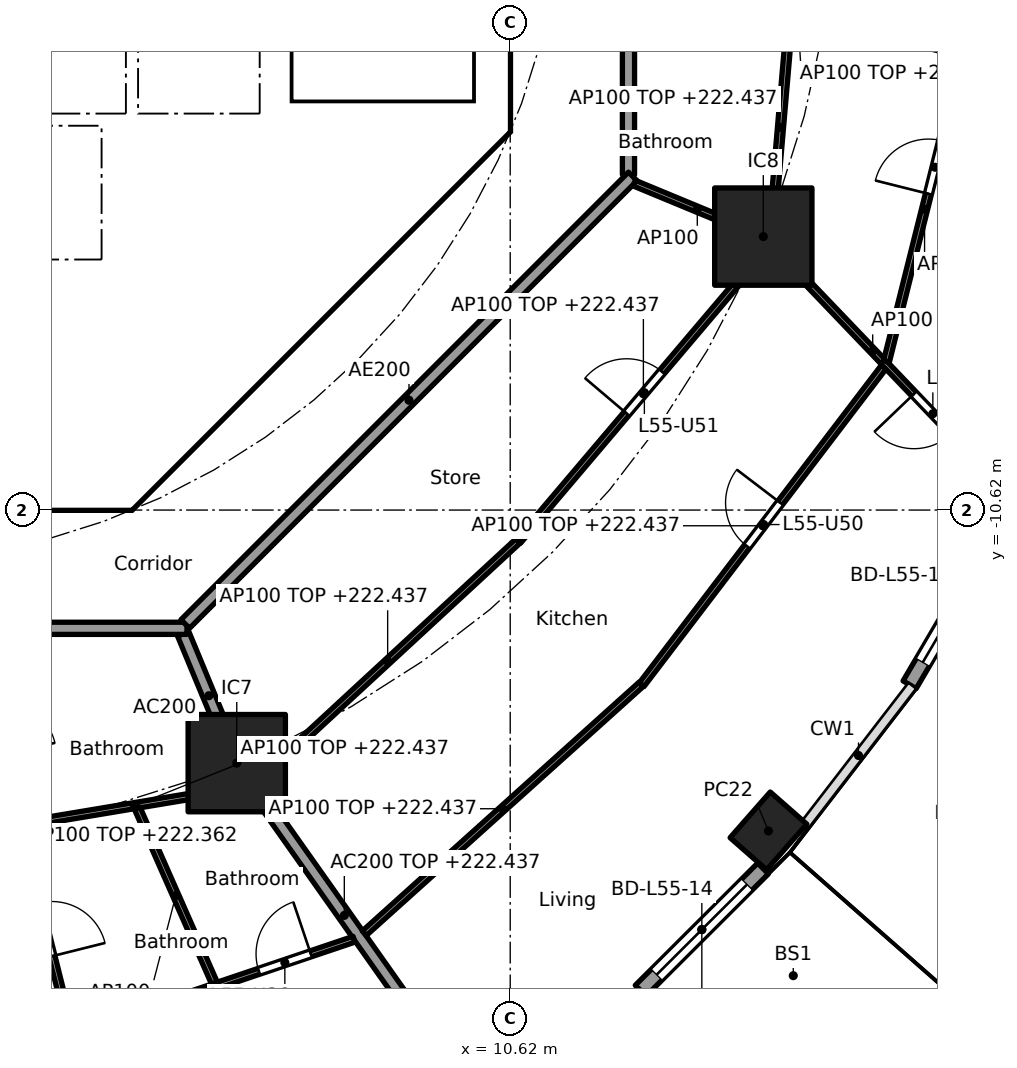
"""IFC4 building model, lengths in metres.
Left out: names, types, materials, properties, quantities, classifications, styles, units other than length and angle.
Written with IfcOpenShell. Run it as: python <this file> out.ifc"""

import sys

from ifc_helpers import new_model, si_unit, direction, frame, frame_2d, origin, origin_2d, place, context, subcontext, project, spatial, polyline, rectangle, hollow_rectangle, outline, extrude, element, fill, save


model = new_model("IFC4")
c1 = context("Model", 3, precision=1e-05, world=origin(), true_north=direction((0.0, 1.0)))
c2 = subcontext(c1, "Body", "Model", "MODEL_VIEW")
j1 = project(units=[si_unit("LENGTHUNIT", "METRE"), si_unit("PLANEANGLEUNIT", "RADIAN")], contexts=[c1])
p1 = place(None, origin())
s1 = spatial("IfcSite", under=j1, at=p1, CompositionType="ELEMENT")
p2 = place(p1, origin())
s2 = spatial("IfcBuilding", under=s1, at=p2, CompositionType="ELEMENT")
p3 = place(p2, frame((0.0, 0.0, 219.6)))
s3 = spatial("IfcBuildingStorey", under=s2, at=p3, CompositionType="ELEMENT", Elevation=219.6)
p4 = place(p3, frame((14.866, -15.896, 0.0), z_axis=(0.0, 0.0, 1.0), x_axis=(0.660114607735, 0.751164898445, 0.0)))
e1 = element("IfcColumn", 1, at=p4, inside=s3, PredefinedType="COLUMN", context=c2, shape_type="SweptSolid", body=[
    extrude(hollow_rectangle(XDim=1.0, YDim=0.8, WallThickness=0.032, at=origin_2d()), origin(), (0.0, 0.0, 1.0), 3.7),
])
for number, where, z_axis, x_axis in (
    (2, (6.123, -14.782, 0.0), (0.0, 0.0, 1.0), (1.0, 0.0, 0.0)),
    (3, (14.782, -6.123, 0.0), (0.0, 0.0, 1.0), (1.0, 0.0, 0.0)),
):
    element("IfcColumn", number, at=place(p3, frame(where, z_axis=z_axis, x_axis=x_axis)), inside=s3, PredefinedType="COLUMN", context=c2, shape_type="SweptSolid", body=[
        extrude(rectangle(XDim=1.6, YDim=1.6, at=origin_2d()), origin(), (0.0, 0.0, 1.0), 3.7),
    ])
p5 = place(p3, frame((14.778, -16.515, 0.0), z_axis=(0.0, 0.0, 1.0), x_axis=(-0.707836044127, -0.706376765356, 0.0)))
e4 = element("IfcWall", 4, at=p5, inside=s3, PredefinedType="SOLIDWALL", context=c2, shape_type="SweptSolid", body=[
    extrude(rectangle(XDim=2.844, YDim=0.25, at=frame_2d((1.422, 0.0))), origin(), (0.0, 0.0, 1.0), 3.44),
])
p6 = place(p5, frame((0.372, 0.0, 0.0)))
e5 = element("IfcOpeningElement", 5, at=p6, cuts=e4, PredefinedType="OPENING", context=c2, shape_type="SweptSolid", body=[
    extrude(rectangle(XDim=2.1, YDim=2.4, at=frame_2d((1.05, 1.2))), frame((0.0, 0.135, 0.0), z_axis=(0.0, -1.0, 0.0), x_axis=(1.0, 0.0, 0.0)), (0.0, 0.0, 1.0), 0.27),
])
p7 = place(p3, frame((18.684, -10.945, 0.0), z_axis=(0.0, 0.0, 1.0), x_axis=(-0.5063555387, -0.862324804484, 0.0)))
e6 = element("IfcWall", 6, at=p7, inside=s3, PredefinedType="SOLIDWALL", context=c2, shape_type="SweptSolid", body=[
    extrude(rectangle(XDim=2.955, YDim=0.25, at=frame_2d((1.477, 0.0))), origin(), (0.0, 0.0, 1.0), 3.44),
])
p8 = place(p7, frame((0.427, 0.0, 0.0)))
e7 = element("IfcOpeningElement", 7, at=p8, cuts=e6, PredefinedType="OPENING", context=c2, shape_type="SweptSolid", body=[
    extrude(rectangle(XDim=2.1, YDim=2.4, at=frame_2d((1.05, 1.2))), frame((0.0, 0.135, 0.0), z_axis=(0.0, -1.0, 0.0), x_axis=(1.0, 0.0, 0.0)), (0.0, 0.0, 1.0), 0.27),
])
p9 = place(p3, frame((4.613, -9.988, 0.0), z_axis=(0.0, 0.0, 1.0), x_axis=(0.707106781187, 0.707106781187, 0.0)))
e8 = element("IfcWall", 8, at=p9, inside=s3, PredefinedType="SHEAR", context=c2, shape_type="SweptSolid", body=[
    extrude(rectangle(XDim=7.602, YDim=0.6, at=frame_2d((3.801, 0.0))), origin(), (0.0, 0.0, 1.0), 3.44),
])
p10 = place(p9, frame((3.201, 0.0, 0.0)))
e9 = element("IfcOpeningElement", 9, at=p10, cuts=e8, PredefinedType="OPENING", context=c2, shape_type="SweptSolid", body=[
    extrude(rectangle(XDim=1.2, YDim=2.1, at=frame_2d((0.6, 1.05))), frame((0.0, 0.31, 0.0), z_axis=(0.0, -1.0, 0.0), x_axis=(1.0, 0.0, 0.0)), (0.0, 0.0, 1.0), 0.62),
])
p11 = place(p3, frame((4.0, -10.025, 0.0), z_axis=(0.0, 0.0, 1.0), x_axis=(0.0, 1.0, 0.0)))
e10 = element("IfcWall", 10, at=p11, inside=s3, PredefinedType="SOLIDWALL", context=c2, shape_type="SweptSolid", body=[
    extrude(rectangle(XDim=3.0, YDim=0.2, at=frame_2d((1.5, 0.0))), origin(), (0.0, 0.0, 1.0), 3.44),
])
p12 = place(p11, frame((0.975, 0.0, 0.0)))
e11 = element("IfcOpeningElement", 11, at=p12, cuts=e10, PredefinedType="OPENING", context=c2, shape_type="SweptSolid", body=[
    extrude(rectangle(XDim=1.1, YDim=2.1, at=frame_2d((0.55, 1.05))), frame((0.0, 0.11, 0.0), z_axis=(0.0, -1.0, 0.0), x_axis=(1.0, 0.0, 0.0)), (0.0, 0.0, 1.0), 0.22),
])
p13 = place(p3, frame((4.0, -6.5, 0.0), z_axis=(0.0, 0.0, 1.0), x_axis=(0.0, 1.0, 0.0)))
e12 = element("IfcWall", 12, at=p13, inside=s3, PredefinedType="SOLIDWALL", context=c2, shape_type="SweptSolid", body=[
    extrude(rectangle(XDim=2.2, YDim=0.2, at=frame_2d((1.1, 0.0))), origin(), (0.0, 0.0, 1.0), 3.44),
])
p14 = place(p13, frame((0.55, 0.0, 0.0)))
e13 = element("IfcOpeningElement", 13, at=p14, cuts=e12, PredefinedType="OPENING", context=c2, shape_type="SweptSolid", body=[
    extrude(rectangle(XDim=1.1, YDim=2.1, at=frame_2d((0.55, 1.05))), frame((0.0, 0.11, 0.0), z_axis=(0.0, -1.0, 0.0), x_axis=(1.0, 0.0, 0.0)), (0.0, 0.0, 1.0), 0.22),
])
p15 = place(p3, origin())
e14 = element("IfcWall", 14, at=p15, inside=s3, PredefinedType="SHEAR", context=c2, shape_type="SweptSolid", body=[
    extrude(outline(polyline([(-4.152, -10.025), (4.152, -10.025), (4.401, -9.776), (4.825, -10.2), (4.401, -10.625), (-4.401, -10.625), (-4.825, -10.2), (-4.401, -9.776), (-4.152, -10.025)])), origin(), (0.0, 0.0, 1.0), 3.44),
])
p16 = place(p3, origin())
e15 = element("IfcWall", 15, at=p16, inside=s3, PredefinedType="SHEAR", context=c2, shape_type="SweptSolid", body=[
    extrude(outline(polyline([(9.776, -4.401), (10.025, -4.152), (10.025, -3.801), (10.025, 4.152), (9.776, 4.401), (10.2, 4.825), (10.625, 4.401), (10.625, -4.401), (10.2, -4.825), (9.776, -4.401)])), origin(), (0.0, 0.0, 1.0), 3.44),
])
p17 = place(p3, origin())
e16 = element("IfcWall", 16, at=p17, inside=s3, PredefinedType="SOLIDWALL", context=c2, shape_type="SweptSolid", body=[
    extrude(outline(polyline([(-6.7, -2.1), (-6.5, -2.1), (-6.5, -4.1), (-2.3, -4.1), (-2.3, -2.1), (-2.1, -2.1), (-2.1, -4.1), (-0.1, -4.1), (-0.1, -2.1), (0.1, -2.1), (0.1, -4.1), (2.1, -4.1), (2.1, -2.1), (2.3, -2.1), (2.3, -4.1), (4.3, -4.1), (4.3, -2.1), (4.5, -2.1), (4.5, -4.1), (6.5, -4.1), (6.5, -2.1), (6.7, -2.1), (6.7, -4.3), (-6.7, -4.3), (-6.7, -2.1)])), origin(), (0.0, 0.0, 1.0), 3.44),
])
p18 = place(p3, origin())
e17 = element("IfcWall", 17, at=p18, inside=s3, PredefinedType="SOLIDWALL", context=c2, shape_type="SweptSolid", body=[
    extrude(outline(polyline([(4.1, -7.025), (-4.1, -7.025), (-4.1, -6.5), (4.1, -6.5), (4.1, -7.025)])), origin(), (0.0, 0.0, 1.0), 3.44),
])
p19 = place(p3, origin())
e18 = element("IfcWall", 18, at=p19, inside=s3, PredefinedType="SOLIDWALL", context=c2, shape_type="SweptSolid", body=[
    extrude(outline(polyline([(7.025, -3.9), (6.7, -3.9), (6.7, 3.9), (7.025, 3.9), (7.025, -3.9)])), origin(), (0.0, 0.0, 1.0), 3.44),
])
p20 = place(p3, origin())
e19 = element("IfcWall", 19, at=p20, inside=s3, PredefinedType="SOLIDWALL", context=c2, shape_type="SweptSolid", body=[
    extrude(outline(polyline([(10.025, -4.1), (6.7, -4.1), (6.7, -3.9), (10.025, -3.9), (10.025, -4.1)])), origin(), (0.0, 0.0, 1.0), 3.44),
])
p21 = place(p3, frame((5.243, -12.657, 0.0), z_axis=(0.0, 0.0, 1.0), x_axis=(0.382691608661, -0.923876145736, 0.0)))
e20 = element("IfcWall", 20, at=p21, inside=s3, PredefinedType="PARTITIONING", context=c2, shape_type="SweptSolid", body=[
    extrude(rectangle(XDim=2.2, YDim=0.2, at=frame_2d((1.1, 0.0))), origin(), (0.0, 0.0, 1.0), 3.44),
])
p22 = place(p3, frame((6.152, -14.823, 0.0), z_axis=(0.0, 0.0, 1.0), x_axis=(0.576994695158, -0.816747893637, 0.0)))
e21 = element("IfcWall", 21, at=p22, inside=s3, PredefinedType="PARTITIONING", context=c2, shape_type="SweptSolid", body=[
    extrude(rectangle(XDim=6.03, YDim=0.2, at=frame_2d((3.015, 0.0))), origin(), (0.0, 0.0, 1.0), 2.837),
])
p23 = place(p3, frame((12.565, -5.104, 0.0), z_axis=(0.0, 0.0, 1.0), x_axis=(0.0, 1.0, 0.0)))
e22 = element("IfcWall", 22, at=p23, inside=s3, PredefinedType="PARTITIONING", context=c2, shape_type="SweptSolid", body=[
    extrude(rectangle(XDim=10.209, YDim=0.2, at=frame_2d((5.104, 0.0))), origin(), (0.0, 0.0, 1.0), 3.44),
])
p24 = place(p23, frame((4.604, 0.0, 0.0)))
e23 = element("IfcOpeningElement", 23, at=p24, cuts=e22, PredefinedType="OPENING", context=c2, shape_type="SweptSolid", body=[
    extrude(rectangle(XDim=1.0, YDim=2.1, at=frame_2d((0.5, 1.05))), frame((0.0, 0.11, 0.0), z_axis=(0.0, -1.0, 0.0), x_axis=(1.0, 0.0, 0.0)), (0.0, 0.0, 1.0), 0.22),
])
p25 = place(p3, frame((-5.104, -12.565, 0.0), z_axis=(0.0, 0.0, 1.0), x_axis=(1.0, 0.0, 0.0)))
e24 = element("IfcWall", 24, at=p25, inside=s3, PredefinedType="PARTITIONING", context=c2, shape_type="SweptSolid", body=[
    extrude(rectangle(XDim=10.409, YDim=0.2, at=frame_2d((5.205, 0.0))), origin(), (0.0, 0.0, 1.0), 3.44),
])
p26 = place(p25, frame((4.604, 0.0, 0.0)))
e25 = element("IfcOpeningElement", 25, at=p26, cuts=e24, PredefinedType="OPENING", context=c2, shape_type="SweptSolid", body=[
    extrude(rectangle(XDim=1.0, YDim=2.1, at=frame_2d((0.5, 1.05))), frame((0.0, 0.11, 0.0), z_axis=(0.0, -1.0, 0.0), x_axis=(1.0, 0.0, 0.0)), (0.0, 0.0, 1.0), 0.22),
])
p27 = place(p3, frame((5.275, -12.494, 0.0), z_axis=(0.0, 0.0, 1.0), x_axis=(0.707106781187, 0.707106781187, 0.0)))
e26 = element("IfcWall", 26, at=p27, inside=s3, PredefinedType="PARTITIONING", context=c2, shape_type="SweptSolid", body=[
    extrude(rectangle(XDim=10.409, YDim=0.2, at=frame_2d((5.205, 0.0))), origin(), (0.0, 0.0, 1.0), 3.44),
])
p28 = place(p3, frame((1.759, -12.662, 0.0), z_axis=(0.0, 0.0, 1.0), x_axis=(0.242653275363, -0.970113079984, 0.0)))
e27 = element("IfcWall", 27, at=p28, inside=s3, PredefinedType="PARTITIONING", context=c2, shape_type="SweptSolid", body=[
    extrude(rectangle(XDim=6.836, YDim=0.1, at=frame_2d((3.418, 0.0))), origin(), (0.0, 0.0, 1.0), 2.762),
])
p29 = place(p28, frame((1.166, 0.0, 0.0)))
e28 = element("IfcOpeningElement", 28, at=p29, cuts=e27, PredefinedType="OPENING", context=c2, shape_type="SweptSolid", body=[
    extrude(rectangle(XDim=0.9, YDim=2.1, at=frame_2d((0.45, 1.05))), frame((0.0, 0.06, 0.0), z_axis=(0.0, -1.0, 0.0), x_axis=(1.0, 0.0, 0.0)), (0.0, 0.0, 1.0), 0.12),
])
p30 = place(p28, frame((4.559, 0.0, 0.0)))
e29 = element("IfcOpeningElement", 29, at=p30, cuts=e27, PredefinedType="OPENING", context=c2, shape_type="SweptSolid", body=[
    extrude(rectangle(XDim=0.9, YDim=2.1, at=frame_2d((0.45, 1.05))), frame((0.0, 0.06, 0.0), z_axis=(0.0, -1.0, 0.0), x_axis=(1.0, 0.0, 0.0)), (0.0, 0.0, 1.0), 0.12),
])
p31 = place(p3, frame((2.593, -15.789, 0.0), z_axis=(0.0, 0.0, 1.0), x_axis=(0.986385117656, 0.164451815639, 0.0)))
e30 = element("IfcWall", 30, at=p31, inside=s3, PredefinedType="PARTITIONING", context=c2, shape_type="SweptSolid", body=[
    extrude(rectangle(XDim=3.747, YDim=0.1, at=frame_2d((1.874, 0.0))), origin(), (0.0, 0.0, 1.0), 2.837),
])
p32 = place(p3, frame((3.453, -19.229, 0.0), z_axis=(0.0, 0.0, 1.0), x_axis=(0.947565610716, 0.31956128268, 0.0)))
e31 = element("IfcWall", 31, at=p32, inside=s3, PredefinedType="PARTITIONING", context=c2, shape_type="SweptSolid", body=[
    extrude(rectangle(XDim=4.853, YDim=0.1, at=frame_2d((2.426, 0.0))), origin(), (0.0, 0.0, 1.0), 2.837),
])
p33 = place(p32, frame((3.202, 0.0, 0.0)))
e32 = element("IfcOpeningElement", 32, at=p33, cuts=e31, PredefinedType="OPENING", context=c2, shape_type="SweptSolid", body=[
    extrude(rectangle(XDim=0.9, YDim=2.1, at=frame_2d((0.45, 1.05))), frame((0.0, 0.06, 0.0), z_axis=(0.0, -1.0, 0.0), x_axis=(1.0, 0.0, 0.0)), (0.0, 0.0, 1.0), 0.12),
])
p34 = place(p3, frame((4.485, -15.522, 0.0), z_axis=(0.0, 0.0, 1.0), x_axis=(0.40391918208, -0.914794673327, 0.0)))
e33 = element("IfcWall", 33, at=p34, inside=s3, PredefinedType="PARTITIONING", context=c2, shape_type="SweptSolid", body=[
    extrude(rectangle(XDim=3.146, YDim=0.1, at=frame_2d((1.573, 0.0))), origin(), (0.0, 0.0, 1.0), 3.44),
])
p35 = place(p3, frame((6.461, -15.088, 0.0), z_axis=(0.0, 0.0, 1.0), x_axis=(0.73461579427, 0.678483334217, 0.0)))
e34 = element("IfcWall", 34, at=p35, inside=s3, PredefinedType="PARTITIONING", context=c2, shape_type="SweptSolid", body=[
    extrude(rectangle(XDim=5.837, YDim=0.1, at=frame_2d((2.918, 0.0))), origin(), (0.0, 0.0, 1.0), 2.837),
])
p36 = place(p3, frame((8.22, -17.579, 0.0), z_axis=(0.0, 0.0, 1.0), x_axis=(0.743696370895, 0.668517544958, 0.0)))
e35 = element("IfcWall", 35, at=p36, inside=s3, PredefinedType="PARTITIONING", context=c2, shape_type="SweptSolid", body=[
    extrude(rectangle(XDim=6.125, YDim=0.1, at=frame_2d((3.062, 0.0))), origin(), (0.0, 0.0, 1.0), 2.837),
])
p37 = place(p3, frame((10.753, -11.132, 0.0), z_axis=(0.0, 0.0, 1.0), x_axis=(0.647001799757, 0.762488472773, 0.0)))
e36 = element("IfcWall", 36, at=p37, inside=s3, PredefinedType="PARTITIONING", context=c2, shape_type="SweptSolid", body=[
    extrude(rectangle(XDim=6.359, YDim=0.1, at=frame_2d((3.179, 0.0))), origin(), (0.0, 0.0, 1.0), 2.837),
])
p38 = place(p37, frame((2.754, 0.0, 0.0)))
e37 = element("IfcOpeningElement", 37, at=p38, cuts=e36, PredefinedType="OPENING", context=c2, shape_type="SweptSolid", body=[
    extrude(rectangle(XDim=0.9, YDim=2.1, at=frame_2d((0.45, 1.05))), frame((0.0, 0.06, 0.0), z_axis=(0.0, -1.0, 0.0), x_axis=(1.0, 0.0, 0.0)), (0.0, 0.0, 1.0), 0.12),
])
p39 = place(p3, frame((12.782, -13.491, 0.0), z_axis=(0.0, 0.0, 1.0), x_axis=(0.606136140755, 0.795360911078, 0.0)))
e38 = element("IfcWall", 38, at=p39, inside=s3, PredefinedType="PARTITIONING", context=c2, shape_type="SweptSolid", body=[
    extrude(rectangle(XDim=6.57, YDim=0.1, at=frame_2d((3.285, 0.0))), origin(), (0.0, 0.0, 1.0), 2.837),
])
p40 = place(p39, frame((2.86, 0.0, 0.0)))
e39 = element("IfcOpeningElement", 39, at=p40, cuts=e38, PredefinedType="OPENING", context=c2, shape_type="SweptSolid", body=[
    extrude(rectangle(XDim=0.9, YDim=2.1, at=frame_2d((0.45, 1.05))), frame((0.0, 0.06, 0.0), z_axis=(0.0, -1.0, 0.0), x_axis=(1.0, 0.0, 0.0)), (0.0, 0.0, 1.0), 0.12),
])
p41 = place(p3, frame((12.657, -5.243, 0.0), z_axis=(0.0, 0.0, 1.0), x_axis=(0.923864733477, -0.382719158442, 0.0)))
e40 = element("IfcWall", 40, at=p41, inside=s3, PredefinedType="PARTITIONING", context=c2, shape_type="SweptSolid", body=[
    extrude(rectangle(XDim=2.25, YDim=0.1, at=frame_2d((1.125, 0.0))), origin(), (0.0, 0.0, 1.0), 3.44),
])
p42 = place(p3, frame((14.817, -6.159, 0.0), z_axis=(0.0, 0.0, 1.0), x_axis=(0.691437669875, -0.722436120828, 0.0)))
e41 = element("IfcWall", 41, at=p42, inside=s3, PredefinedType="PARTITIONING", context=c2, shape_type="SweptSolid", body=[
    extrude(rectangle(XDim=5.104, YDim=0.1, at=frame_2d((2.552, 0.0))), origin(), (0.0, 0.0, 1.0), 3.44),
])
p43 = place(p42, frame((3.532, 0.0, 0.0)))
e42 = element("IfcOpeningElement", 42, at=p43, cuts=e41, PredefinedType="OPENING", context=c2, shape_type="SweptSolid", body=[
    extrude(rectangle(XDim=0.9, YDim=2.1, at=frame_2d((0.45, 1.05))), frame((0.0, 0.06, 0.0), z_axis=(0.0, -1.0, 0.0), x_axis=(1.0, 0.0, 0.0)), (0.0, 0.0, 1.0), 0.12),
])
p44 = place(p3, frame((14.904, -6.196, 0.0), z_axis=(0.0, 0.0, 1.0), x_axis=(0.085843822439, 0.996308605879, 0.0)))
e43 = element("IfcWall", 43, at=p44, inside=s3, PredefinedType="PARTITIONING", context=c2, shape_type="SweptSolid", body=[
    extrude(rectangle(XDim=3.754, YDim=0.1, at=frame_2d((1.877, 0.0))), origin(), (0.0, 0.0, 1.0), 2.837),
])
p45 = place(p3, frame((16.807, -8.177, 0.0), z_axis=(0.0, 0.0, 1.0), x_axis=(0.243002985225, 0.970025540474, 0.0)))
e44 = element("IfcWall", 44, at=p45, inside=s3, PredefinedType="PARTITIONING", context=c2, shape_type="SweptSolid", body=[
    extrude(rectangle(XDim=5.162, YDim=0.1, at=frame_2d((2.581, 0.0))), origin(), (0.0, 0.0, 1.0), 2.837),
])
p46 = place(p45, frame((2.844, 0.0, 0.0)))
e45 = element("IfcOpeningElement", 45, at=p46, cuts=e44, PredefinedType="OPENING", context=c2, shape_type="SweptSolid", body=[
    extrude(rectangle(XDim=0.9, YDim=2.1, at=frame_2d((0.45, 1.05))), frame((0.0, 0.06, 0.0), z_axis=(0.0, -1.0, 0.0), x_axis=(1.0, 0.0, 0.0)), (0.0, 0.0, 1.0), 0.12),
])
p47 = place(p3, frame((12.662, -1.759, 0.0), z_axis=(0.0, 0.0, 1.0), x_axis=(0.969746519828, -0.24411408661, 0.0)))
e46 = element("IfcWall", 46, at=p47, inside=s3, PredefinedType="PARTITIONING", context=c2, shape_type="SweptSolid", body=[
    extrude(rectangle(XDim=5.531, YDim=0.1, at=frame_2d((2.765, 0.0))), origin(), (0.0, 0.0, 1.0), 2.762),
])
p48 = place(p47, frame((0.874, 0.0, 0.0)))
e47 = element("IfcOpeningElement", 47, at=p48, cuts=e46, PredefinedType="OPENING", context=c2, shape_type="SweptSolid", body=[
    extrude(rectangle(XDim=0.9, YDim=2.1, at=frame_2d((0.45, 1.05))), frame((0.0, 0.06, 0.0), z_axis=(0.0, -1.0, 0.0), x_axis=(1.0, 0.0, 0.0)), (0.0, 0.0, 1.0), 0.12),
])
p49 = place(p6, origin())
e48 = element("IfcDoor", 48, at=p49, inside=s3, OperationType="SLIDING_TO_LEFT", PredefinedType="DOOR", context=c2, shape_type="SweptSolid", body=[
    extrude(rectangle(XDim=2.1, YDim=2.4, at=frame_2d((1.05, 1.2))), frame((0.0, 0.025, 0.0), z_axis=(0.0, -1.0, 0.0), x_axis=(1.0, 0.0, 0.0)), (0.0, 0.0, 1.0), 0.05),
])
fill(e5, e48)
p50 = place(p8, origin())
e49 = element("IfcDoor", 49, at=p50, inside=s3, OperationType="SLIDING_TO_LEFT", PredefinedType="DOOR", context=c2, shape_type="SweptSolid", body=[
    extrude(rectangle(XDim=2.1, YDim=2.4, at=frame_2d((1.05, 1.2))), frame((0.0, 0.025, 0.0), z_axis=(0.0, -1.0, 0.0), x_axis=(1.0, 0.0, 0.0)), (0.0, 0.0, 1.0), 0.05),
])
fill(e7, e49)
p51 = place(p14, origin())
e50 = element("IfcDoor", 50, at=p51, inside=s3, OperationType="DOUBLE_DOOR_SLIDING", PredefinedType="DOOR", context=c2, shape_type="SweptSolid", body=[
    extrude(rectangle(XDim=1.1, YDim=2.1, at=frame_2d((0.55, 1.05))), frame((0.0, 0.025, 0.0), z_axis=(0.0, -1.0, 0.0), x_axis=(1.0, 0.0, 0.0)), (0.0, 0.0, 1.0), 0.05),
])
fill(e13, e50)
p52 = place(p12, origin())
e51 = element("IfcDoor", 51, at=p52, inside=s3, OperationType="SINGLE_SWING_RIGHT", PredefinedType="DOOR", context=c2, shape_type="SweptSolid", body=[
    extrude(rectangle(XDim=1.1, YDim=2.1, at=frame_2d((0.55, 1.05))), frame((0.0, 0.025, 0.0), z_axis=(0.0, -1.0, 0.0), x_axis=(1.0, 0.0, 0.0)), (0.0, 0.0, 1.0), 0.05),
])
fill(e11, e51)
p53 = place(p10, origin())
e52 = element("IfcDoor", 52, at=p53, inside=s3, OperationType="SINGLE_SWING_RIGHT", PredefinedType="DOOR", context=c2, shape_type="SweptSolid", body=[
    extrude(rectangle(XDim=1.2, YDim=2.1, at=frame_2d((0.6, 1.05))), frame((0.0, 0.025, 0.0), z_axis=(0.0, -1.0, 0.0), x_axis=(1.0, 0.0, 0.0)), (0.0, 0.0, 1.0), 0.05),
])
fill(e9, e52)
p54 = place(p30, origin())
e53 = element("IfcDoor", 53, at=p54, inside=s3, OperationType="SINGLE_SWING_RIGHT", PredefinedType="DOOR", context=c2, shape_type="SweptSolid", body=[
    extrude(rectangle(XDim=0.9, YDim=2.1, at=frame_2d((0.45, 1.05))), frame((0.0, 0.025, 0.0), z_axis=(0.0, -1.0, 0.0), x_axis=(1.0, 0.0, 0.0)), (0.0, 0.0, 1.0), 0.05),
])
fill(e29, e53)
p55 = place(p33, origin())
e54 = element("IfcDoor", 54, at=p55, inside=s3, OperationType="SINGLE_SWING_RIGHT", PredefinedType="DOOR", context=c2, shape_type="SweptSolid", body=[
    extrude(rectangle(XDim=0.9, YDim=2.1, at=frame_2d((0.45, 1.05))), frame((0.0, 0.025, 0.0), z_axis=(0.0, -1.0, 0.0), x_axis=(1.0, 0.0, 0.0)), (0.0, 0.0, 1.0), 0.05),
])
fill(e32, e54)
p56 = place(p46, origin())
e55 = element("IfcDoor", 55, at=p56, inside=s3, OperationType="SINGLE_SWING_LEFT", PredefinedType="DOOR", context=c2, shape_type="SweptSolid", body=[
    extrude(rectangle(XDim=0.9, YDim=2.1, at=frame_2d((0.45, 1.05))), frame((0.0, 0.025, 0.0), z_axis=(0.0, -1.0, 0.0), x_axis=(1.0, 0.0, 0.0)), (0.0, 0.0, 1.0), 0.05),
])
fill(e45, e55)
p57 = place(p43, frame((0.9, 0.0, 0.0), x_axis=(-1.0, 0.0, 0.0)))
e56 = element("IfcDoor", 56, at=p57, inside=s3, OperationType="SINGLE_SWING_RIGHT", PredefinedType="DOOR", context=c2, shape_type="SweptSolid", body=[
    extrude(rectangle(XDim=0.9, YDim=2.1, at=frame_2d((0.45, 1.05))), frame((0.0, 0.025, 0.0), z_axis=(0.0, -1.0, 0.0), x_axis=(1.0, 0.0, 0.0)), (0.0, 0.0, 1.0), 0.05),
])
fill(e42, e56)
p58 = place(p40, origin())
e57 = element("IfcDoor", 57, at=p58, inside=s3, OperationType="SINGLE_SWING_RIGHT", PredefinedType="DOOR", context=c2, shape_type="SweptSolid", body=[
    extrude(rectangle(XDim=0.9, YDim=2.1, at=frame_2d((0.45, 1.05))), frame((0.0, 0.025, 0.0), z_axis=(0.0, -1.0, 0.0), x_axis=(1.0, 0.0, 0.0)), (0.0, 0.0, 1.0), 0.05),
])
fill(e39, e57)
p59 = place(p38, origin())
e58 = element("IfcDoor", 58, at=p59, inside=s3, OperationType="SINGLE_SWING_LEFT", PredefinedType="DOOR", context=c2, shape_type="SweptSolid", body=[
    extrude(rectangle(XDim=0.9, YDim=2.1, at=frame_2d((0.45, 1.05))), frame((0.0, 0.025, 0.0), z_axis=(0.0, -1.0, 0.0), x_axis=(1.0, 0.0, 0.0)), (0.0, 0.0, 1.0), 0.05),
])
fill(e37, e58)
save(model, sys.argv[1])
